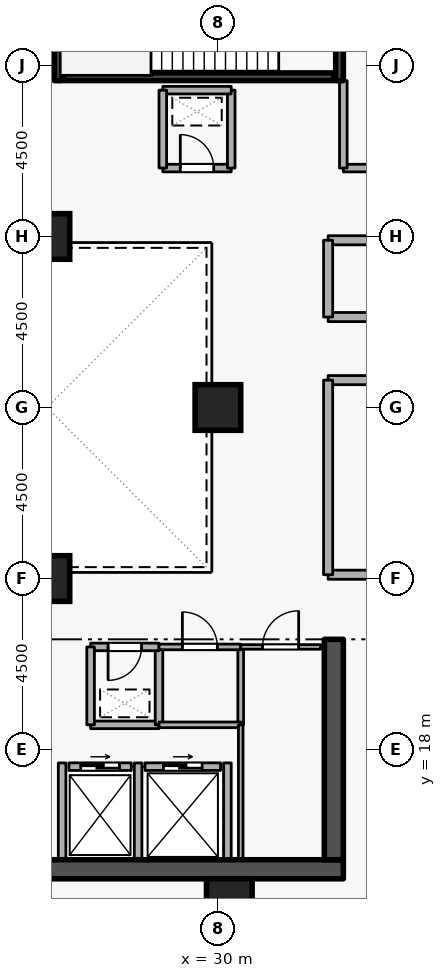
"""IFC4 building model, lengths in metres.
Left out: names, types, materials, properties, quantities, classifications, styles, units other than length and angle.
Written with IfcOpenShell. Run it as: python <this file> out.ifc"""

import sys

from ifc_helpers import new_model, si_unit, direction, frame, frame_2d, origin, origin_2d, place, context, subcontext, project, spatial, rectangle, extrude, element, fill, save


model = new_model("IFC4")
c1 = context("Model", 3, precision=1e-05, world=origin(), true_north=direction((0.0, 1.0)))
c2 = subcontext(c1, "Body", "Model", "MODEL_VIEW")
j1 = project(units=[si_unit("LENGTHUNIT", "METRE"), si_unit("PLANEANGLEUNIT", "RADIAN")], contexts=[c1])
p1 = place(None, origin())
s1 = spatial("IfcSite", under=j1, at=p1, CompositionType="ELEMENT")
p2 = place(p1, origin())
s2 = spatial("IfcBuilding", under=s1, at=p2, CompositionType="ELEMENT")
p3 = place(p2, frame((0.0, 0.0, 141.3)))
s3 = spatial("IfcBuildingStorey", under=s2, at=p3, CompositionType="ELEMENT", Elevation=141.3)
p4 = place(p3, frame((17.7, 14.85, 0.0), z_axis=(0.0, 0.0, 1.0), x_axis=(1.0, 0.0, 0.0)))
e1 = element("IfcWall", 1, at=p4, inside=s3, PredefinedType="SHEAR", context=c2, shape_type="SweptSolid", body=[
    extrude(rectangle(XDim=15.6, YDim=0.5, at=frame_2d((7.8, 0.0))), origin(), (0.0, 0.0, 1.0), 4.2),
])
p5 = place(p3, frame((33.05, 15.1, 0.0), z_axis=(0.0, 0.0, 1.0), x_axis=(0.0, 1.0, 0.0)))
e2 = element("IfcWall", 2, at=p5, inside=s3, PredefinedType="SHEAR", context=c2, shape_type="SweptSolid", body=[
    extrude(rectangle(XDim=5.8, YDim=0.5, at=frame_2d((2.9, 0.0))), origin(), (0.0, 0.0, 1.0), 4.2),
])
for number, where, z_axis, x_axis in (
    (3, (30.3, 14.0, 0.0), (0.0, 0.0, 1.0), (1.0, 0.0, 0.0)),
    (4, (25.5, 22.5, 0.0), (0.0, 0.0, 1.0), (1.0, 0.0, 0.0)),
    (5, (25.5, 31.5, 0.0), (0.0, 0.0, 1.0), (1.0, 0.0, 0.0)),
    (6, (30.0, 27.0, 0.0), (0.0, 0.0, 1.0), (1.0, 0.0, 0.0)),
):
    element("IfcColumn", number, at=place(p3, frame(where, z_axis=z_axis, x_axis=x_axis)), inside=s3, PredefinedType="COLUMN", context=c2, shape_type="SweptSolid", body=[
        extrude(rectangle(XDim=1.2, YDim=1.2, at=origin_2d()), origin(), (0.0, 0.0, 1.0), 4.2),
    ])
p6 = place(p3, frame((26.08, 17.55, 0.0), z_axis=(0.0, 0.0, 1.0), x_axis=(1.0, 0.0, 0.0)))
e7 = element("IfcWall", 7, at=p6, inside=s3, PredefinedType="STANDARD", context=c2, shape_type="SweptSolid", body=[
    extrude(rectangle(XDim=1.64, YDim=0.2, at=frame_2d((0.82, 0.0))), origin(), (0.0, 0.0, 1.0), 3.94),
])
p7 = place(p6, frame((0.31, 0.0, 0.0)))
e8 = element("IfcOpeningElement", 8, at=p7, cuts=e7, PredefinedType="OPENING", context=c2, shape_type="SweptSolid", body=[
    extrude(rectangle(XDim=1.02, YDim=2.06, at=frame_2d((0.51, 1.03))), frame((0.0, 0.11, 0.0), z_axis=(0.0, -1.0, 0.0), x_axis=(1.0, 0.0, 0.0)), (0.0, 0.0, 1.0), 0.22),
])
p8 = place(p3, frame((28.08, 17.55, 0.0), z_axis=(0.0, 0.0, 1.0), x_axis=(1.0, 0.0, 0.0)))
e9 = element("IfcWall", 9, at=p8, inside=s3, PredefinedType="STANDARD", context=c2, shape_type="SweptSolid", body=[
    extrude(rectangle(XDim=1.99, YDim=0.2, at=frame_2d((0.995, 0.0))), origin(), (0.0, 0.0, 1.0), 3.94),
])
p9 = place(p8, frame((0.485, 0.0, 0.0)))
e10 = element("IfcOpeningElement", 10, at=p9, cuts=e9, PredefinedType="OPENING", context=c2, shape_type="SweptSolid", body=[
    extrude(rectangle(XDim=1.02, YDim=2.06, at=frame_2d((0.51, 1.03))), frame((0.0, 0.11, 0.0), z_axis=(0.0, -1.0, 0.0), x_axis=(1.0, 0.0, 0.0)), (0.0, 0.0, 1.0), 0.22),
])
for number, where, z_axis, x_axis in (
    (11, (27.9, 15.112, 0.0), (0.0, 0.0, 1.0), (0.0, 1.0, 0.0)),
    (12, (25.9, 15.112, 0.0), (0.0, 0.0, 1.0), (0.0, 1.0, 0.0)),
    (13, (30.25, 15.112, 0.0), (0.0, 0.0, 1.0), (0.0, 1.0, 0.0)),
):
    element("IfcWall", number, at=place(p3, frame(where, z_axis=z_axis, x_axis=x_axis)), inside=s3, PredefinedType="STANDARD", context=c2, shape_type="SweptSolid", body=[
        extrude(rectangle(XDim=2.536, YDim=0.2, at=frame_2d((1.268, 0.0))), origin(), (0.0, 0.0, 1.0), 3.94),
    ])
p10 = place(p3, frame((33.2, 38.95, 0.0), z_axis=(0.0, 0.0, 1.0), x_axis=(0.0, -1.0, 0.0)))
e14 = element("IfcWall", 14, at=p10, inside=s3, PredefinedType="SHEAR", context=c2, shape_type="SweptSolid", body=[
    extrude(rectangle(XDim=3.35, YDim=0.2, at=frame_2d((1.675, 0.0))), origin(), (0.0, 0.0, 1.0), 4.2),
])
p11 = place(p10, frame((1.125, 0.0, 0.0)))
e15 = element("IfcOpeningElement", 15, at=p11, cuts=e14, PredefinedType="OPENING", context=c2, shape_type="SweptSolid", body=[
    extrude(rectangle(XDim=1.1, YDim=2.1, at=frame_2d((0.55, 1.05))), frame((0.0, 0.11, 0.0), z_axis=(0.0, -1.0, 0.0), x_axis=(1.0, 0.0, 0.0)), (0.0, 0.0, 1.0), 0.22),
])
p12 = place(p3, frame((25.8, 35.6, 0.0), z_axis=(0.0, 0.0, 1.0), x_axis=(0.0, 1.0, 0.0)))
e16 = element("IfcWall", 16, at=p12, inside=s3, PredefinedType="SHEAR", context=c2, shape_type="SweptSolid", body=[
    extrude(rectangle(XDim=3.35, YDim=0.2, at=frame_2d((1.675, 0.0))), origin(), (0.0, 0.0, 1.0), 4.2),
])
p13 = place(p3, frame((25.95, 35.703, 0.0), z_axis=(0.0, 0.0, 1.0), x_axis=(1.0, 0.0, 0.0)))
e17 = element("IfcWall", 17, at=p13, inside=s3, PredefinedType="SHEAR", context=c2, shape_type="SweptSolid", body=[
    extrude(rectangle(XDim=7.1, YDim=0.2, at=frame_2d((3.55, 0.0))), origin(), (0.0, 0.0, 1.0), 4.2),
])
p14 = place(p3, frame((33.3, 33.3, 0.0), z_axis=(0.0, 0.0, 1.0), x_axis=(1.0, 0.0, 0.0)))
e18 = element("IfcWall", 18, at=p14, inside=s3, PredefinedType="STANDARD", context=c2, shape_type="SweptSolid", body=[
    extrude(rectangle(XDim=2.5, YDim=0.2, at=frame_2d((1.25, 0.0))), origin(), (0.0, 0.0, 1.0), 3.94),
])
p15 = place(p14, frame((0.675, 0.0, 0.0)))
e19 = element("IfcOpeningElement", 19, at=p15, cuts=e18, PredefinedType="OPENING", context=c2, shape_type="SweptSolid", body=[
    extrude(rectangle(XDim=1.15, YDim=2.1, at=frame_2d((0.575, 1.05))), frame((0.0, 0.11, 0.0), z_axis=(0.0, -1.0, 0.0), x_axis=(1.0, 0.0, 0.0)), (0.0, 0.0, 1.0), 0.22),
])
p16 = place(p3, frame((33.3, 35.6, 0.0), z_axis=(0.0, 0.0, 1.0), x_axis=(0.0, -1.0, 0.0)))
e20 = element("IfcWall", 20, at=p16, inside=s3, PredefinedType="STANDARD", context=c2, shape_type="SweptSolid", body=[
    extrude(rectangle(XDim=2.3, YDim=0.2, at=frame_2d((1.15, 0.0))), origin(), (0.0, 0.0, 1.0), 3.145),
])
p17 = place(p3, frame((26.65, 18.65, 0.0), z_axis=(0.0, 0.0, 1.0), x_axis=(1.0, 0.0, 0.0)))
e21 = element("IfcWall", 21, at=p17, inside=s3, PredefinedType="STANDARD", context=c2, shape_type="SweptSolid", body=[
    extrude(rectangle(XDim=1.8, YDim=0.2, at=frame_2d((0.9, 0.0))), origin(), (0.0, 0.0, 1.0), 3.94),
])
p18 = place(p3, frame((28.45, 18.65, 0.0), z_axis=(0.0, 0.0, 1.0), x_axis=(0.0, 1.0, 0.0)))
e22 = element("IfcWall", 22, at=p18, inside=s3, PredefinedType="STANDARD", context=c2, shape_type="SweptSolid", body=[
    extrude(rectangle(XDim=2.05, YDim=0.2, at=frame_2d((1.025, 0.0))), origin(), (0.0, 0.0, 1.0), 3.94),
])
p19 = place(p3, frame((28.45, 20.7, 0.0), z_axis=(0.0, 0.0, 1.0), x_axis=(-1.0, 0.0, 0.0)))
e23 = element("IfcWall", 23, at=p19, inside=s3, PredefinedType="STANDARD", context=c2, shape_type="SweptSolid", body=[
    extrude(rectangle(XDim=1.8, YDim=0.2, at=frame_2d((0.9, 0.0))), origin(), (0.0, 0.0, 1.0), 3.94),
])
p20 = place(p19, frame((0.46, 0.0, 0.0)))
e24 = element("IfcOpeningElement", 24, at=p20, cuts=e23, PredefinedType="OPENING", context=c2, shape_type="SweptSolid", body=[
    extrude(rectangle(XDim=0.88, YDim=2.04, at=frame_2d((0.44, 1.02))), frame((0.0, 0.11, 0.0), z_axis=(0.0, -1.0, 0.0), x_axis=(1.0, 0.0, 0.0)), (0.0, 0.0, 1.0), 0.22),
])
p21 = place(p3, frame((26.65, 20.7, 0.0), z_axis=(0.0, 0.0, 1.0), x_axis=(0.0, -1.0, 0.0)))
e25 = element("IfcWall", 25, at=p21, inside=s3, PredefinedType="STANDARD", context=c2, shape_type="SweptSolid", body=[
    extrude(rectangle(XDim=2.05, YDim=0.2, at=frame_2d((1.025, 0.0))), origin(), (0.0, 0.0, 1.0), 3.94),
])
p22 = place(p3, frame((28.55, 33.3, 0.0), z_axis=(0.0, 0.0, 1.0), x_axis=(1.0, 0.0, 0.0)))
e26 = element("IfcWall", 26, at=p22, inside=s3, PredefinedType="STANDARD", context=c2, shape_type="SweptSolid", body=[
    extrude(rectangle(XDim=1.8, YDim=0.2, at=frame_2d((0.9, 0.0))), origin(), (0.0, 0.0, 1.0), 3.94),
])
p23 = place(p22, frame((0.46, 0.0, 0.0)))
e27 = element("IfcOpeningElement", 27, at=p23, cuts=e26, PredefinedType="OPENING", context=c2, shape_type="SweptSolid", body=[
    extrude(rectangle(XDim=0.88, YDim=2.04, at=frame_2d((0.44, 1.02))), frame((0.0, 0.11, 0.0), z_axis=(0.0, -1.0, 0.0), x_axis=(1.0, 0.0, 0.0)), (0.0, 0.0, 1.0), 0.22),
])
p24 = place(p3, frame((30.35, 33.3, 0.0), z_axis=(0.0, 0.0, 1.0), x_axis=(0.0, 1.0, 0.0)))
e28 = element("IfcWall", 28, at=p24, inside=s3, PredefinedType="STANDARD", context=c2, shape_type="SweptSolid", body=[
    extrude(rectangle(XDim=2.05, YDim=0.2, at=frame_2d((1.025, 0.0))), origin(), (0.0, 0.0, 1.0), 3.94),
])
p25 = place(p3, frame((30.35, 35.35, 0.0), z_axis=(0.0, 0.0, 1.0), x_axis=(-1.0, 0.0, 0.0)))
e29 = element("IfcWall", 29, at=p25, inside=s3, PredefinedType="STANDARD", context=c2, shape_type="SweptSolid", body=[
    extrude(rectangle(XDim=1.8, YDim=0.2, at=frame_2d((0.9, 0.0))), origin(), (0.0, 0.0, 1.0), 3.94),
])
p26 = place(p3, frame((28.55, 35.35, 0.0), z_axis=(0.0, 0.0, 1.0), x_axis=(0.0, -1.0, 0.0)))
e30 = element("IfcWall", 30, at=p26, inside=s3, PredefinedType="STANDARD", context=c2, shape_type="SweptSolid", body=[
    extrude(rectangle(XDim=2.05, YDim=0.2, at=frame_2d((1.025, 0.0))), origin(), (0.0, 0.0, 1.0), 3.94),
])
p27 = place(p3, frame((32.9, 27.72, 0.0), z_axis=(0.0, 0.0, 1.0), x_axis=(1.0, 0.0, 0.0)))
e31 = element("IfcWall", 31, at=p27, inside=s3, PredefinedType="STANDARD", context=c2, shape_type="SweptSolid", body=[
    extrude(rectangle(XDim=6.65, YDim=0.24, at=frame_2d((3.325, 0.0))), origin(), (0.0, 0.0, 1.0), 3.94),
])
p28 = place(p27, frame((2.725, 0.0, 0.0)))
e32 = element("IfcOpeningElement", 32, at=p28, cuts=e31, PredefinedType="OPENING", context=c2, shape_type="SweptSolid", body=[
    extrude(rectangle(XDim=1.2, YDim=2.1, at=frame_2d((0.6, 1.05))), frame((0.0, 0.13, 0.0), z_axis=(0.0, -1.0, 0.0), x_axis=(1.0, 0.0, 0.0)), (0.0, 0.0, 1.0), 0.26),
])
p29 = place(p3, frame((35.8, 22.6, 0.0), z_axis=(0.0, 0.0, 1.0), x_axis=(-1.0, 0.0, 0.0)))
e33 = element("IfcWall", 33, at=p29, inside=s3, PredefinedType="STANDARD", context=c2, shape_type="SweptSolid", body=[
    extrude(rectangle(XDim=2.9, YDim=0.24, at=frame_2d((1.45, 0.0))), origin(), (0.0, 0.0, 1.0), 3.94),
])
p30 = place(p3, frame((32.9, 22.6, 0.0), z_axis=(0.0, 0.0, 1.0), x_axis=(0.0, 1.0, 0.0)))
e34 = element("IfcWall", 34, at=p30, inside=s3, PredefinedType="STANDARD", context=c2, shape_type="SweptSolid", body=[
    extrude(rectangle(XDim=5.12, YDim=0.24, at=frame_2d((2.56, 0.0))), origin(), (0.0, 0.0, 1.0), 3.145),
])
p31 = place(p3, frame((32.9, 31.4, 0.0), z_axis=(0.0, 0.0, 1.0), x_axis=(1.0, 0.0, 0.0)))
e35 = element("IfcWall", 35, at=p31, inside=s3, PredefinedType="STANDARD", context=c2, shape_type="SweptSolid", body=[
    extrude(rectangle(XDim=2.9, YDim=0.24, at=frame_2d((1.45, 0.0))), origin(), (0.0, 0.0, 1.0), 3.94),
])
p32 = place(p3, frame((39.55, 29.38, 0.0), z_axis=(0.0, 0.0, 1.0), x_axis=(-1.0, 0.0, 0.0)))
e36 = element("IfcWall", 36, at=p32, inside=s3, PredefinedType="STANDARD", context=c2, shape_type="SweptSolid", body=[
    extrude(rectangle(XDim=6.65, YDim=0.24, at=frame_2d((3.325, 0.0))), origin(), (0.0, 0.0, 1.0), 3.94),
])
p33 = place(p32, frame((2.725, 0.0, 0.0)))
e37 = element("IfcOpeningElement", 37, at=p33, cuts=e36, PredefinedType="OPENING", context=c2, shape_type="SweptSolid", body=[
    extrude(rectangle(XDim=1.2, YDim=2.1, at=frame_2d((0.6, 1.05))), frame((0.0, 0.13, 0.0), z_axis=(0.0, -1.0, 0.0), x_axis=(1.0, 0.0, 0.0)), (0.0, 0.0, 1.0), 0.26),
])
p34 = place(p3, frame((32.9, 29.38, 0.0), z_axis=(0.0, 0.0, 1.0), x_axis=(0.0, 1.0, 0.0)))
e38 = element("IfcWall", 38, at=p34, inside=s3, PredefinedType="STANDARD", context=c2, shape_type="SweptSolid", body=[
    extrude(rectangle(XDim=2.02, YDim=0.24, at=frame_2d((1.01, 0.0))), origin(), (0.0, 0.0, 1.0), 3.145),
])
p35 = place(p3, frame((30.6, 20.7, 0.0), z_axis=(0.0, 0.0, 1.0), x_axis=(0.0, -1.0, 0.0)))
e39 = element("IfcWall", 39, at=p35, inside=s3, PredefinedType="PARTITIONING", context=c2, shape_type="SweptSolid", body=[
    extrude(rectangle(XDim=2.05, YDim=0.15, at=frame_2d((1.025, 0.0))), origin(), (0.0, 0.0, 1.0), 3.94),
])
p36 = place(p3, frame((30.6, 18.65, 0.0), z_axis=(0.0, 0.0, 1.0), x_axis=(-1.0, 0.0, 0.0)))
e40 = element("IfcWall", 40, at=p36, inside=s3, PredefinedType="PARTITIONING", context=c2, shape_type="SweptSolid", body=[
    extrude(rectangle(XDim=2.15, YDim=0.15, at=frame_2d((1.075, 0.0))), origin(), (0.0, 0.0, 1.0), 3.94),
])
p37 = place(p3, frame((28.45, 20.7, 0.0), z_axis=(0.0, 0.0, 1.0), x_axis=(1.0, 0.0, 0.0)))
e41 = element("IfcWall", 41, at=p37, inside=s3, PredefinedType="PARTITIONING", context=c2, shape_type="SweptSolid", body=[
    extrude(rectangle(XDim=2.15, YDim=0.15, at=frame_2d((1.075, 0.0))), origin(), (0.0, 0.0, 1.0), 3.94),
])
p38 = place(p37, frame((0.615, 0.0, 0.0)))
e42 = element("IfcOpeningElement", 42, at=p38, cuts=e41, PredefinedType="OPENING", context=c2, shape_type="SweptSolid", body=[
    extrude(rectangle(XDim=0.92, YDim=2.08, at=frame_2d((0.46, 1.04))), frame((0.0, 0.085, 0.0), z_axis=(0.0, -1.0, 0.0), x_axis=(1.0, 0.0, 0.0)), (0.0, 0.0, 1.0), 0.17),
])
p39 = place(p3, frame((30.6, 15.1, 0.0), z_axis=(0.0, 0.0, 1.0), x_axis=(0.0, 1.0, 0.0)))
e43 = element("IfcWall", 43, at=p39, inside=s3, PredefinedType="PARTITIONING", context=c2, shape_type="SweptSolid", body=[
    extrude(rectangle(XDim=3.55, YDim=0.12, at=frame_2d((1.775, 0.0))), origin(), (0.0, 0.0, 1.0), 3.94),
])
p40 = place(p3, frame((30.6, 20.7, 0.0), z_axis=(0.0, 0.0, 1.0), x_axis=(1.0, 0.0, 0.0)))
e44 = element("IfcWall", 44, at=p40, inside=s3, PredefinedType="PARTITIONING", context=c2, shape_type="SweptSolid", body=[
    extrude(rectangle(XDim=2.1, YDim=0.12, at=frame_2d((1.05, 0.0))), origin(), (0.0, 0.0, 1.0), 3.94),
])
p41 = place(p40, frame((0.575, 0.0, 0.0)))
e45 = element("IfcOpeningElement", 45, at=p41, cuts=e44, PredefinedType="OPENING", context=c2, shape_type="SweptSolid", body=[
    extrude(rectangle(XDim=0.95, YDim=2.1, at=frame_2d((0.475, 1.05))), frame((0.0, 0.07, 0.0), z_axis=(0.0, -1.0, 0.0), x_axis=(1.0, 0.0, 0.0)), (0.0, 0.0, 1.0), 0.14),
])
p42 = place(p7, origin())
e46 = element("IfcDoor", 46, at=p42, inside=s3, OperationType="SLIDING_TO_LEFT", PredefinedType="DOOR", context=c2, shape_type="SweptSolid", body=[
    extrude(rectangle(XDim=1.02, YDim=2.06, at=frame_2d((0.51, 1.03))), frame((0.0, 0.025, 0.0), z_axis=(0.0, -1.0, 0.0), x_axis=(1.0, 0.0, 0.0)), (0.0, 0.0, 1.0), 0.05),
])
fill(e8, e46)
p43 = place(p9, origin())
e47 = element("IfcDoor", 47, at=p43, inside=s3, OperationType="SLIDING_TO_LEFT", PredefinedType="DOOR", context=c2, shape_type="SweptSolid", body=[
    extrude(rectangle(XDim=1.02, YDim=2.06, at=frame_2d((0.51, 1.03))), frame((0.0, 0.025, 0.0), z_axis=(0.0, -1.0, 0.0), x_axis=(1.0, 0.0, 0.0)), (0.0, 0.0, 1.0), 0.05),
])
fill(e10, e47)
p44 = place(p20, origin())
e48 = element("IfcDoor", 48, at=p44, inside=s3, OperationType="SINGLE_SWING_RIGHT", PredefinedType="DOOR", context=c2, shape_type="SweptSolid", body=[
    extrude(rectangle(XDim=0.88, YDim=2.04, at=frame_2d((0.44, 1.02))), frame((0.0, 0.025, 0.0), z_axis=(0.0, -1.0, 0.0), x_axis=(1.0, 0.0, 0.0)), (0.0, 0.0, 1.0), 0.05),
])
fill(e24, e48)
p45 = place(p23, origin())
e49 = element("IfcDoor", 49, at=p45, inside=s3, OperationType="SINGLE_SWING_LEFT", PredefinedType="DOOR", context=c2, shape_type="SweptSolid", body=[
    extrude(rectangle(XDim=0.88, YDim=2.04, at=frame_2d((0.44, 1.02))), frame((0.0, 0.025, 0.0), z_axis=(0.0, -1.0, 0.0), x_axis=(1.0, 0.0, 0.0)), (0.0, 0.0, 1.0), 0.05),
])
fill(e27, e49)
p46 = place(p38, origin())
e50 = element("IfcDoor", 50, at=p46, inside=s3, OperationType="SINGLE_SWING_LEFT", PredefinedType="DOOR", context=c2, shape_type="SweptSolid", body=[
    extrude(rectangle(XDim=0.92, YDim=2.08, at=frame_2d((0.46, 1.04))), frame((0.0, 0.025, 0.0), z_axis=(0.0, -1.0, 0.0), x_axis=(1.0, 0.0, 0.0)), (0.0, 0.0, 1.0), 0.05),
])
fill(e42, e50)
p47 = place(p41, origin())
e51 = element("IfcDoor", 51, at=p47, inside=s3, OperationType="SINGLE_SWING_RIGHT", PredefinedType="DOOR", context=c2, shape_type="SweptSolid", body=[
    extrude(rectangle(XDim=0.95, YDim=2.1, at=frame_2d((0.475, 1.05))), frame((0.0, 0.025, 0.0), z_axis=(0.0, -1.0, 0.0), x_axis=(1.0, 0.0, 0.0)), (0.0, 0.0, 1.0), 0.05),
])
fill(e45, e51)
save(model, sys.argv[1])
